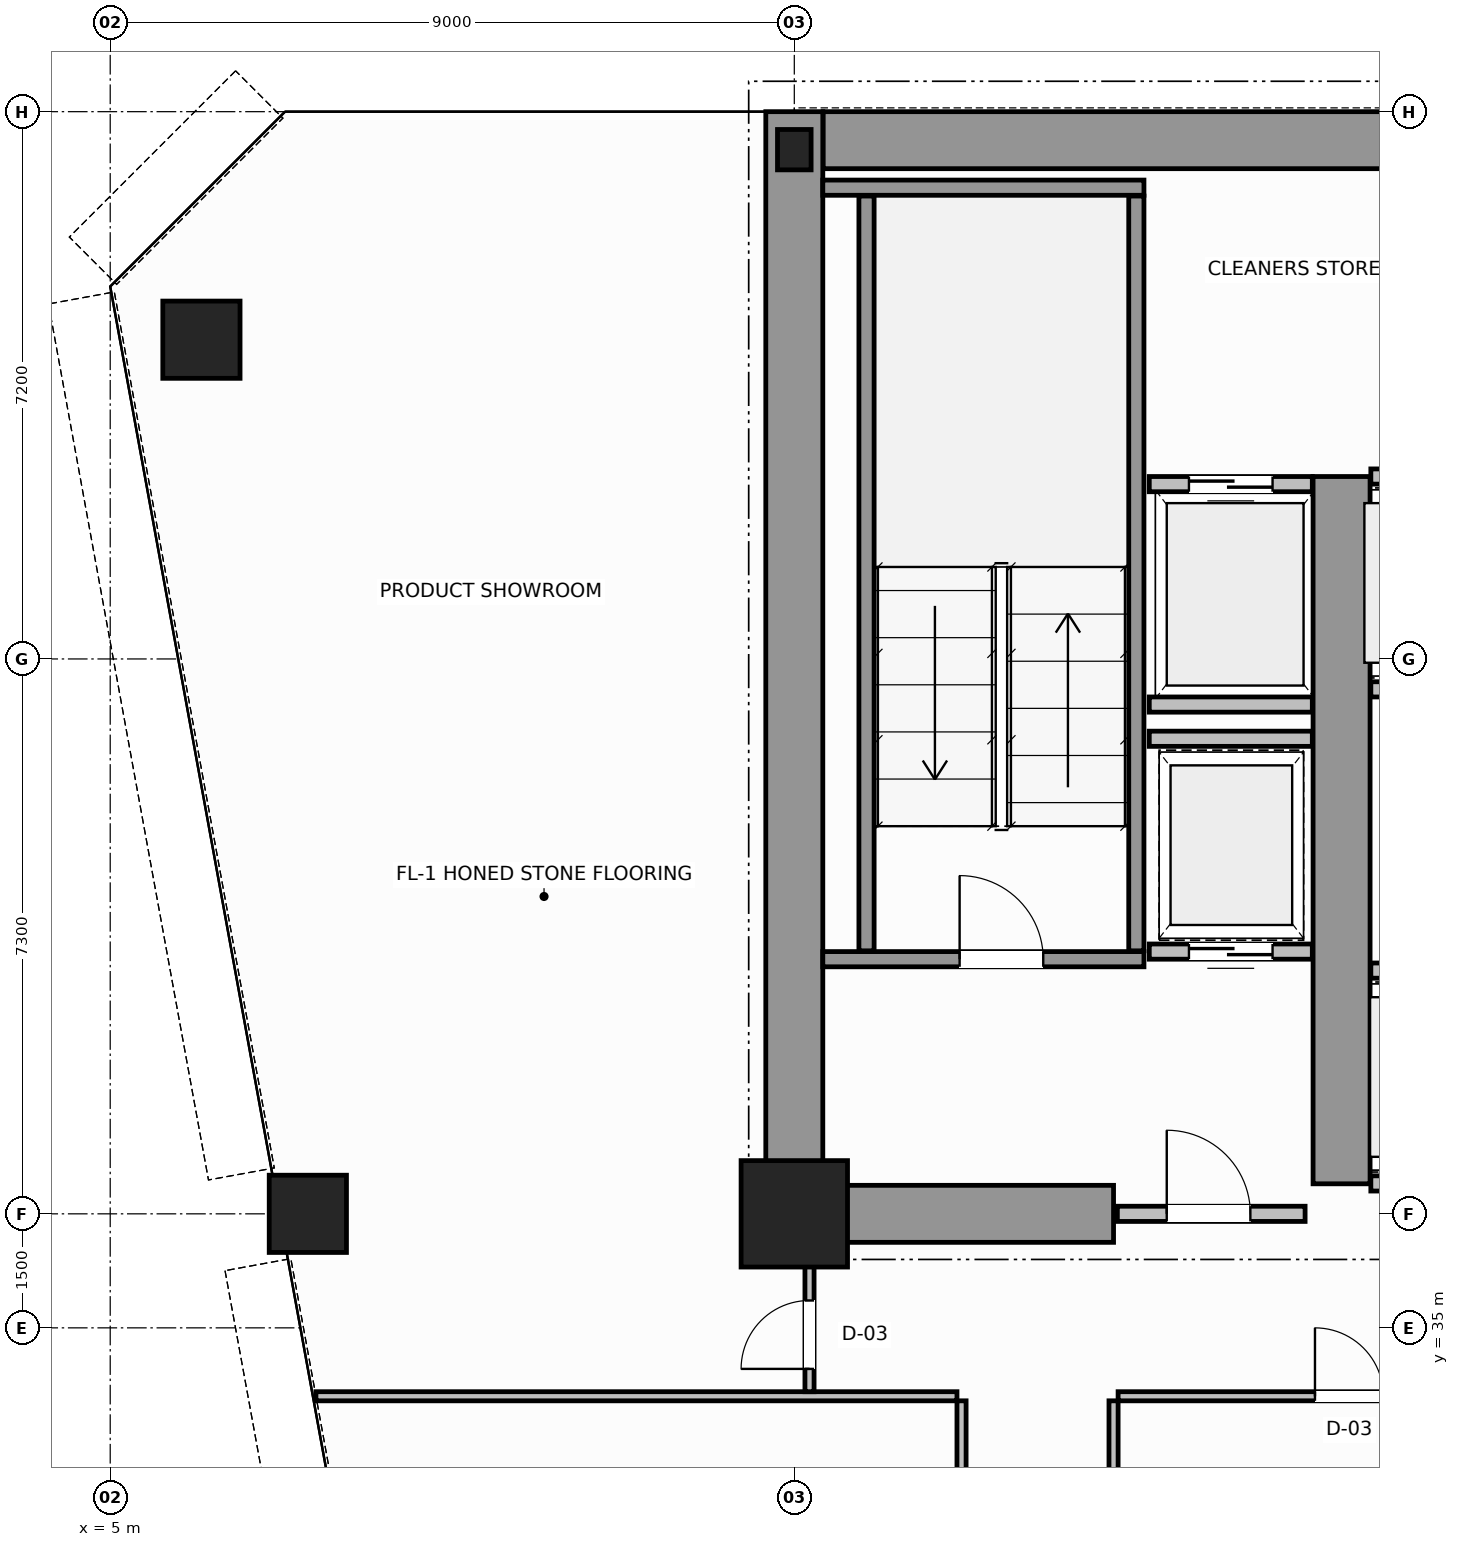
"""IFC4 building model, lengths in metres.
Left out: names, types, materials, properties, quantities, classifications, styles, units other than length and angle.
Written with IfcOpenShell. Run it as: python <this file> out.ifc"""

import sys

from ifc_helpers import new_model, si_unit, direction, frame, frame_2d, origin, origin_2d, place, context, subcontext, project, spatial, rectangle, hollow_circle, i_section, extrude, source, transform, mapped, element, fill, save


model = new_model("IFC4")
c1 = context("Model", 3, precision=1e-05, world=origin(), true_north=direction((0.0, 1.0)))
c2 = subcontext(c1, "Body", "Model", "MODEL_VIEW")
j1 = project(units=[si_unit("LENGTHUNIT", "METRE"), si_unit("PLANEANGLEUNIT", "RADIAN")], contexts=[c1])
p1 = place(None, origin())
s1 = spatial("IfcSite", under=j1, at=p1, CompositionType="ELEMENT")
p2 = place(p1, origin())
s2 = spatial("IfcBuilding", under=s1, at=p2, CompositionType="ELEMENT")
p3 = place(p2, frame((0.0, 0.0, 92.0)))
s3 = spatial("IfcBuildingStorey", under=s2, at=p3, CompositionType="ELEMENT", Elevation=92.0)
m1 = source(origin(), c2, "Body", "SweptSolid", [
    extrude(rectangle(XDim=1.4, YDim=1.4, at=origin_2d()), origin(), (0.0, 0.0, 1.0), 3.8),
])
p4 = place(p3, frame((14.0, 36.5, 0.0), z_axis=(0.0, 0.0, 1.0), x_axis=(1.0, 0.0, 0.0)))
e1 = element("IfcColumn", 1, at=p4, inside=s3, PredefinedType="COLUMN", context=c2, shape_type="MappedRepresentation", body=[
    mapped(m1, transform((0.0, 0.0, 0.0), scale=1.0)),
])
m2 = source(origin(), c2, "Body", "SweptSolid", [
    extrude(i_section(OverallWidth=0.442, OverallDepth=0.531, WebThickness=0.065, FlangeThickness=0.076, FilletRadius=0.015, at=origin_2d()), origin(), (0.0, 0.0, 1.0), 3.8),
])
p5 = place(p3, frame((14.0, 50.5, 0.0), z_axis=(0.0, 0.0, 1.0), x_axis=(1.0, 0.0, 0.0)))
e2 = element("IfcColumn", 2, at=p5, inside=s3, PredefinedType="COLUMN", context=c2, shape_type="MappedRepresentation", body=[
    mapped(m2, transform((0.0, 0.0, 0.0), scale=1.0)),
])
m3 = source(origin(), c2, "Body", "SweptSolid", [
    extrude(hollow_circle(Radius=0.508, WallThickness=0.045, at=origin_2d()), origin(), (0.0, 0.0, 1.0), 3.8),
])
for number, where, z_axis, x_axis in (
    (3, (6.2, 48.0, 0.0), (0.0, 0.0, 1.0), (1.0, 0.0, 0.0)),
    (4, (7.6, 36.5, 0.0), (0.0, 0.0, 1.0), (1.0, 0.0, 0.0)),
):
    element("IfcColumn", number, at=place(p3, frame(where, z_axis=z_axis, x_axis=x_axis)), inside=s3, PredefinedType="COLUMN", context=c2, shape_type="MappedRepresentation", body=[
        mapped(m3, transform((0.0, 0.0, 0.0), scale=1.0)),
    ])
p6 = place(p3, frame((14.379, 50.625, 0.0), z_axis=(0.0, 0.0, 1.0), x_axis=(1.0, 0.0, 0.0)))
e5 = element("IfcWall", 5, at=p6, inside=s3, PredefinedType="SHEAR", context=c2, shape_type="SweptSolid", body=[
    extrude(rectangle(XDim=19.619, YDim=0.75, at=frame_2d((9.81, 0.0))), origin(), (0.0, 0.0, 1.0), 3.8),
])
p7 = place(p3, frame((14.0, 36.5, 0.0), z_axis=(0.0, 0.0, 1.0), x_axis=(0.0, 1.0, 0.0)))
e6 = element("IfcWall", 6, at=p7, inside=s3, PredefinedType="SHEAR", context=c2, shape_type="SweptSolid", body=[
    extrude(rectangle(XDim=14.5, YDim=0.75, at=frame_2d((7.25, 0.0))), origin(), (0.0, 0.0, 1.0), 3.8),
])
p8 = place(p3, frame((14.395, 36.5, 0.0), z_axis=(0.0, 0.0, 1.0), x_axis=(1.0, 0.0, 0.0)))
e7 = element("IfcWall", 7, at=p8, inside=s3, PredefinedType="SHEAR", context=c2, shape_type="SweptSolid", body=[
    extrude(rectangle(XDim=3.805, YDim=0.75, at=frame_2d((1.902, 0.0))), origin(), (0.0, 0.0, 1.0), 2.38),
])
p9 = place(p3, frame((21.2, 36.895, 0.0), z_axis=(0.0, 0.0, 1.0), x_axis=(0.0, 1.0, 0.0)))
e8 = element("IfcWall", 8, at=p9, inside=s3, PredefinedType="SHEAR", context=c2, shape_type="SweptSolid", body=[
    extrude(rectangle(XDim=9.305, YDim=0.75, at=frame_2d((4.652, 0.0))), origin(), (0.0, 0.0, 1.0), 3.8),
])
p10 = place(p3, frame((14.375, 39.85, 0.0), z_axis=(0.0, 0.0, 1.0), x_axis=(1.0, 0.0, 0.0)))
e9 = element("IfcWall", 9, at=p10, inside=s3, PredefinedType="SOLIDWALL", context=c2, shape_type="SweptSolid", body=[
    extrude(rectangle(XDim=4.225, YDim=0.2, at=frame_2d((2.113, 0.0))), origin(), (0.0, 0.0, 1.0), 3.8),
])
p11 = place(p10, frame((1.8, 0.0, 0.0)))
e10 = element("IfcOpeningElement", 10, at=p11, cuts=e9, PredefinedType="OPENING", context=c2, shape_type="SweptSolid", body=[
    extrude(rectangle(XDim=1.1, YDim=2.15, at=frame_2d((0.55, 1.075))), frame((0.0, 0.11, 0.0), z_axis=(0.0, -1.0, 0.0), x_axis=(1.0, 0.0, 0.0)), (0.0, 0.0, 1.0), 0.22),
])
p12 = place(p3, frame((14.375, 50.0, 0.0), z_axis=(0.0, 0.0, 1.0), x_axis=(1.0, 0.0, 0.0)))
e11 = element("IfcWall", 11, at=p12, inside=s3, PredefinedType="SOLIDWALL", context=c2, shape_type="SweptSolid", body=[
    extrude(rectangle(XDim=4.225, YDim=0.2, at=frame_2d((2.113, 0.0))), origin(), (0.0, 0.0, 1.0), 3.8),
])
for number, where, z_axis, x_axis in (
    (12, (14.95, 39.96, 0.0), (0.0, 0.0, 1.0), (0.0, 1.0, 0.0)),
    (13, (18.5, 39.96, 0.0), (0.0, 0.0, 1.0), (0.0, 1.0, 0.0)),
):
    element("IfcWall", number, at=place(p3, frame(where, z_axis=z_axis, x_axis=x_axis)), inside=s3, PredefinedType="SOLIDWALL", context=c2, shape_type="SweptSolid", body=[
        extrude(rectangle(XDim=9.93, YDim=0.2, at=frame_2d((4.965, 0.0))), origin(), (0.0, 0.0, 1.0), 3.8),
    ])
p13 = place(p3, frame((18.25, 36.5, 0.0), z_axis=(0.0, 0.0, 1.0), x_axis=(1.0, 0.0, 0.0)))
e14 = element("IfcWall", 14, at=p13, inside=s3, PredefinedType="SOLIDWALL", context=c2, shape_type="SweptSolid", body=[
    extrude(rectangle(XDim=2.47, YDim=0.2, at=frame_2d((1.235, 0.0))), origin(), (0.0, 0.0, 1.0), 2.37),
])
p14 = place(p13, frame((0.65, 0.0, 0.0)))
e15 = element("IfcOpeningElement", 15, at=p14, cuts=e14, PredefinedType="OPENING", context=c2, shape_type="SweptSolid", body=[
    extrude(rectangle(XDim=1.1, YDim=2.15, at=frame_2d((0.55, 1.075))), frame((0.0, 0.11, 0.0), z_axis=(0.0, -1.0, 0.0), x_axis=(1.0, 0.0, 0.0)), (0.0, 0.0, 1.0), 0.22),
])
p15 = place(p3, frame((21.585, 39.7, 0.0), z_axis=(0.0, 0.0, 1.0), x_axis=(1.0, 0.0, 0.0)))
e16 = element("IfcWall", 16, at=p15, inside=s3, PredefinedType="SOLIDWALL", context=c2, shape_type="SweptSolid", body=[
    extrude(rectangle(XDim=1.845, YDim=0.2, at=frame_2d((0.922, 0.0))), origin(), (0.0, 0.0, 1.0), 3.58),
])
p16 = place(p15, frame((0.372, 0.0, 0.0)))
e17 = element("IfcOpeningElement", 17, at=p16, cuts=e16, PredefinedType="OPENING", context=c2, shape_type="SweptSolid", body=[
    extrude(rectangle(XDim=1.1, YDim=2.15, at=frame_2d((0.55, 1.075))), frame((0.0, 0.11, 0.0), z_axis=(0.0, -1.0, 0.0), x_axis=(1.0, 0.0, 0.0)), (0.0, 0.0, 1.0), 0.22),
])
p17 = place(p3, frame((21.585, 36.9, 0.0), z_axis=(0.0, 0.0, 1.0), x_axis=(1.0, 0.0, 0.0)))
e18 = element("IfcWall", 18, at=p17, inside=s3, PredefinedType="SOLIDWALL", context=c2, shape_type="SweptSolid", body=[
    extrude(rectangle(XDim=1.845, YDim=0.2, at=frame_2d((0.922, 0.0))), origin(), (0.0, 0.0, 1.0), 2.37),
])
p18 = place(p3, frame((21.585, 43.4, 0.0), z_axis=(0.0, 0.0, 1.0), x_axis=(1.0, 0.0, 0.0)))
e19 = element("IfcWall", 19, at=p18, inside=s3, PredefinedType="SOLIDWALL", context=c2, shape_type="SweptSolid", body=[
    extrude(rectangle(XDim=1.725, YDim=0.2, at=frame_2d((0.863, 0.0))), origin(), (0.0, 0.0, 1.0), 3.58),
])
p19 = place(p18, frame((0.312, 0.0, 0.0)))
e20 = element("IfcOpeningElement", 20, at=p19, cuts=e19, PredefinedType="OPENING", context=c2, shape_type="SweptSolid", body=[
    extrude(rectangle(XDim=1.1, YDim=2.15, at=frame_2d((0.55, 1.075))), frame((0.0, 0.11, 0.0), z_axis=(0.0, -1.0, 0.0), x_axis=(1.0, 0.0, 0.0)), (0.0, 0.0, 1.0), 0.22),
])
p20 = place(p3, frame((21.585, 46.2, 0.0), z_axis=(0.0, 0.0, 1.0), x_axis=(1.0, 0.0, 0.0)))
e21 = element("IfcWall", 21, at=p20, inside=s3, PredefinedType="SOLIDWALL", context=c2, shape_type="SweptSolid", body=[
    extrude(rectangle(XDim=1.725, YDim=0.2, at=frame_2d((0.863, 0.0))), origin(), (0.0, 0.0, 1.0), 3.58),
])
p21 = place(p3, frame((18.67, 46.1, 0.0), z_axis=(0.0, 0.0, 1.0), x_axis=(1.0, 0.0, 0.0)))
e22 = element("IfcWall", 22, at=p21, inside=s3, PredefinedType="SOLIDWALL", context=c2, shape_type="SweptSolid", body=[
    extrude(rectangle(XDim=2.145, YDim=0.2, at=frame_2d((1.073, 0.0))), origin(), (0.0, 0.0, 1.0), 3.58),
])
p22 = place(p21, frame((0.522, 0.0, 0.0)))
e23 = element("IfcOpeningElement", 23, at=p22, cuts=e22, PredefinedType="OPENING", context=c2, shape_type="SweptSolid", body=[
    extrude(rectangle(XDim=1.1, YDim=2.15, at=frame_2d((0.55, 1.075))), frame((0.0, 0.11, 0.0), z_axis=(0.0, -1.0, 0.0), x_axis=(1.0, 0.0, 0.0)), (0.0, 0.0, 1.0), 0.22),
])
p23 = place(p3, frame((18.67, 43.2, 0.0), z_axis=(0.0, 0.0, 1.0), x_axis=(1.0, 0.0, 0.0)))
e24 = element("IfcWall", 24, at=p23, inside=s3, PredefinedType="SOLIDWALL", context=c2, shape_type="SweptSolid", body=[
    extrude(rectangle(XDim=2.145, YDim=0.2, at=frame_2d((1.073, 0.0))), origin(), (0.0, 0.0, 1.0), 3.58),
])
p24 = place(p3, frame((18.67, 39.95, 0.0), z_axis=(0.0, 0.0, 1.0), x_axis=(1.0, 0.0, 0.0)))
e25 = element("IfcWall", 25, at=p24, inside=s3, PredefinedType="SOLIDWALL", context=c2, shape_type="SweptSolid", body=[
    extrude(rectangle(XDim=2.145, YDim=0.2, at=frame_2d((1.073, 0.0))), origin(), (0.0, 0.0, 1.0), 3.58),
])
p25 = place(p24, frame((0.522, 0.0, 0.0)))
e26 = element("IfcOpeningElement", 26, at=p25, cuts=e25, PredefinedType="OPENING", context=c2, shape_type="SweptSolid", body=[
    extrude(rectangle(XDim=1.1, YDim=2.15, at=frame_2d((0.55, 1.075))), frame((0.0, 0.11, 0.0), z_axis=(0.0, -1.0, 0.0), x_axis=(1.0, 0.0, 0.0)), (0.0, 0.0, 1.0), 0.22),
])
p26 = place(p3, frame((18.67, 42.75, 0.0), z_axis=(0.0, 0.0, 1.0), x_axis=(1.0, 0.0, 0.0)))
e27 = element("IfcWall", 27, at=p26, inside=s3, PredefinedType="SOLIDWALL", context=c2, shape_type="SweptSolid", body=[
    extrude(rectangle(XDim=2.145, YDim=0.2, at=frame_2d((1.073, 0.0))), origin(), (0.0, 0.0, 1.0), 3.58),
])
p27 = place(p3, frame((18.26, 34.1, 0.0), z_axis=(0.0, 0.0, 1.0), x_axis=(1.0, 0.0, 0.0)))
e28 = element("IfcWall", 28, at=p27, inside=s3, PredefinedType="PARTITIONING", context=c2, shape_type="SweptSolid", body=[
    extrude(rectangle(XDim=31.48, YDim=0.12, at=frame_2d((15.74, 0.0))), origin(), (0.0, 0.0, 1.0), 3.58),
])
p28 = place(p27, frame((2.59, 0.0, 0.0)))
e29 = element("IfcOpeningElement", 29, at=p28, cuts=e28, PredefinedType="OPENING", context=c2, shape_type="SweptSolid", body=[
    extrude(rectangle(XDim=0.9, YDim=2.15, at=frame_2d((0.45, 1.075))), frame((0.0, 0.07, 0.0), z_axis=(0.0, -1.0, 0.0), x_axis=(1.0, 0.0, 0.0)), (0.0, 0.0, 1.0), 0.14),
])
p29 = place(p27, frame((9.89, 0.0, 0.0)))
e30 = element("IfcOpeningElement", 30, at=p29, cuts=e28, PredefinedType="OPENING", context=c2, shape_type="SweptSolid", body=[
    extrude(rectangle(XDim=0.9, YDim=2.15, at=frame_2d((0.45, 1.075))), frame((0.0, 0.07, 0.0), z_axis=(0.0, -1.0, 0.0), x_axis=(1.0, 0.0, 0.0)), (0.0, 0.0, 1.0), 0.14),
])
p30 = place(p27, frame((18.79, 0.0, 0.0)))
e31 = element("IfcOpeningElement", 31, at=p30, cuts=e28, PredefinedType="OPENING", context=c2, shape_type="SweptSolid", body=[
    extrude(rectangle(XDim=0.9, YDim=2.15, at=frame_2d((0.45, 1.075))), frame((0.0, 0.07, 0.0), z_axis=(0.0, -1.0, 0.0), x_axis=(1.0, 0.0, 0.0)), (0.0, 0.0, 1.0), 0.14),
])
p31 = place(p27, frame((27.29, 0.0, 0.0)))
e32 = element("IfcOpeningElement", 32, at=p31, cuts=e28, PredefinedType="OPENING", context=c2, shape_type="SweptSolid", body=[
    extrude(rectangle(XDim=0.9, YDim=2.15, at=frame_2d((0.45, 1.075))), frame((0.0, 0.07, 0.0), z_axis=(0.0, -1.0, 0.0), x_axis=(1.0, 0.0, 0.0)), (0.0, 0.0, 1.0), 0.14),
])
p32 = place(p3, frame((7.706, 34.1, 0.0), z_axis=(0.0, 0.0, 1.0), x_axis=(1.0, 0.0, 0.0)))
e33 = element("IfcWall", 33, at=p32, inside=s3, PredefinedType="PARTITIONING", context=c2, shape_type="SweptSolid", body=[
    extrude(rectangle(XDim=8.434, YDim=0.12, at=frame_2d((4.217, 0.0))), origin(), (0.0, 0.0, 1.0), 3.58),
])
p33 = place(p3, frame((14.2, 34.16, 0.0), z_axis=(0.0, 0.0, 1.0), x_axis=(0.0, 1.0, 0.0)))
e34 = element("IfcWall", 34, at=p33, inside=s3, PredefinedType="PARTITIONING", context=c2, shape_type="SweptSolid", body=[
    extrude(rectangle(XDim=2.28, YDim=0.12, at=frame_2d((1.14, 0.0))), origin(), (0.0, 0.0, 1.0), 3.58),
])
p34 = place(p33, frame((0.3, 0.0, 0.0)))
e35 = element("IfcOpeningElement", 35, at=p34, cuts=e34, PredefinedType="OPENING", context=c2, shape_type="SweptSolid", body=[
    extrude(rectangle(XDim=0.9, YDim=2.15, at=frame_2d((0.45, 1.075))), frame((0.0, 0.07, 0.0), z_axis=(0.0, -1.0, 0.0), x_axis=(1.0, 0.0, 0.0)), (0.0, 0.0, 1.0), 0.14),
])
p35 = place(p3, frame((16.2, 18.2, 0.0), z_axis=(0.0, 0.0, 1.0), x_axis=(0.0, 1.0, 0.0)))
e36 = element("IfcWall", 36, at=p35, inside=s3, PredefinedType="PARTITIONING", context=c2, shape_type="SweptSolid", body=[
    extrude(rectangle(XDim=15.84, YDim=0.12, at=frame_2d((7.92, 0.0))), origin(), (0.0, 0.0, 1.0), 3.58),
])
p36 = place(p35, frame((3.25, 0.0, 0.0)))
e37 = element("IfcOpeningElement", 37, at=p36, cuts=e36, PredefinedType="OPENING", context=c2, shape_type="SweptSolid", body=[
    extrude(rectangle(XDim=0.9, YDim=2.15, at=frame_2d((0.45, 1.075))), frame((0.0, 0.07, 0.0), z_axis=(0.0, -1.0, 0.0), x_axis=(1.0, 0.0, 0.0)), (0.0, 0.0, 1.0), 0.14),
])
p37 = place(p35, frame((11.17, 0.0, 0.0)))
e38 = element("IfcOpeningElement", 38, at=p37, cuts=e36, PredefinedType="OPENING", context=c2, shape_type="SweptSolid", body=[
    extrude(rectangle(XDim=0.9, YDim=2.15, at=frame_2d((0.45, 1.075))), frame((0.0, 0.07, 0.0), z_axis=(0.0, -1.0, 0.0), x_axis=(1.0, 0.0, 0.0)), (0.0, 0.0, 1.0), 0.14),
])
p38 = place(p3, frame((18.2, 18.2, 0.0), z_axis=(0.0, 0.0, 1.0), x_axis=(0.0, 1.0, 0.0)))
e39 = element("IfcWall", 39, at=p38, inside=s3, PredefinedType="PARTITIONING", context=c2, shape_type="SweptSolid", body=[
    extrude(rectangle(XDim=15.84, YDim=0.12, at=frame_2d((7.92, 0.0))), origin(), (0.0, 0.0, 1.0), 3.58),
])
m4 = source(origin(), c2, "Body", "SweptSolid", [
    extrude(rectangle(XDim=1.1, YDim=2.15, at=frame_2d((0.55, 1.075))), frame((0.0, 0.025, 0.0), z_axis=(0.0, -1.0, 0.0), x_axis=(1.0, 0.0, 0.0)), (0.0, 0.0, 1.0), 0.05),
])
p39 = place(p11, origin())
e40 = element("IfcDoor", 40, at=p39, inside=s3, OperationType="SINGLE_SWING_LEFT", PredefinedType="DOOR", context=c2, shape_type="MappedRepresentation", body=[
    mapped(m4, transform((0.0, 0.0, 0.0), scale=1.0)),
])
fill(e10, e40)
p40 = place(p14, origin())
e41 = element("IfcDoor", 41, at=p40, inside=s3, OperationType="SINGLE_SWING_RIGHT", PredefinedType="DOOR", context=c2, shape_type="MappedRepresentation", body=[
    mapped(m4, transform((0.0, 0.0, 0.0), scale=1.0)),
])
fill(e15, e41)
p41 = place(p22, origin())
e42 = element("IfcDoor", 42, at=p41, inside=s3, OperationType="DOUBLE_DOOR_SLIDING", PredefinedType="DOOR", context=c2, shape_type="MappedRepresentation", body=[
    mapped(m4, transform((0.0, 0.0, 0.0), scale=1.0)),
])
fill(e23, e42)
p42 = place(p25, origin())
e43 = element("IfcDoor", 43, at=p42, inside=s3, OperationType="DOUBLE_DOOR_SLIDING", PredefinedType="DOOR", context=c2, shape_type="MappedRepresentation", body=[
    mapped(m4, transform((0.0, 0.0, 0.0), scale=1.0)),
])
fill(e26, e43)
m5 = source(origin(), c2, "Body", "SweptSolid", [
    extrude(rectangle(XDim=0.9, YDim=2.15, at=frame_2d((0.45, 1.075))), frame((0.0, 0.025, 0.0), z_axis=(0.0, -1.0, 0.0), x_axis=(1.0, 0.0, 0.0)), (0.0, 0.0, 1.0), 0.05),
])
p43 = place(p34, origin())
e44 = element("IfcDoor", 44, at=p43, inside=s3, OperationType="SINGLE_SWING_LEFT", PredefinedType="DOOR", context=c2, shape_type="MappedRepresentation", body=[
    mapped(m5, transform((0.0, 0.0, 0.0), scale=1.0)),
])
fill(e35, e44)
p44 = place(p28, origin())
e45 = element("IfcDoor", 45, at=p44, inside=s3, OperationType="SINGLE_SWING_LEFT", PredefinedType="DOOR", context=c2, shape_type="MappedRepresentation", body=[
    mapped(m5, transform((0.0, 0.0, 0.0), scale=1.0)),
])
fill(e29, e45)
save(model, sys.argv[1])
